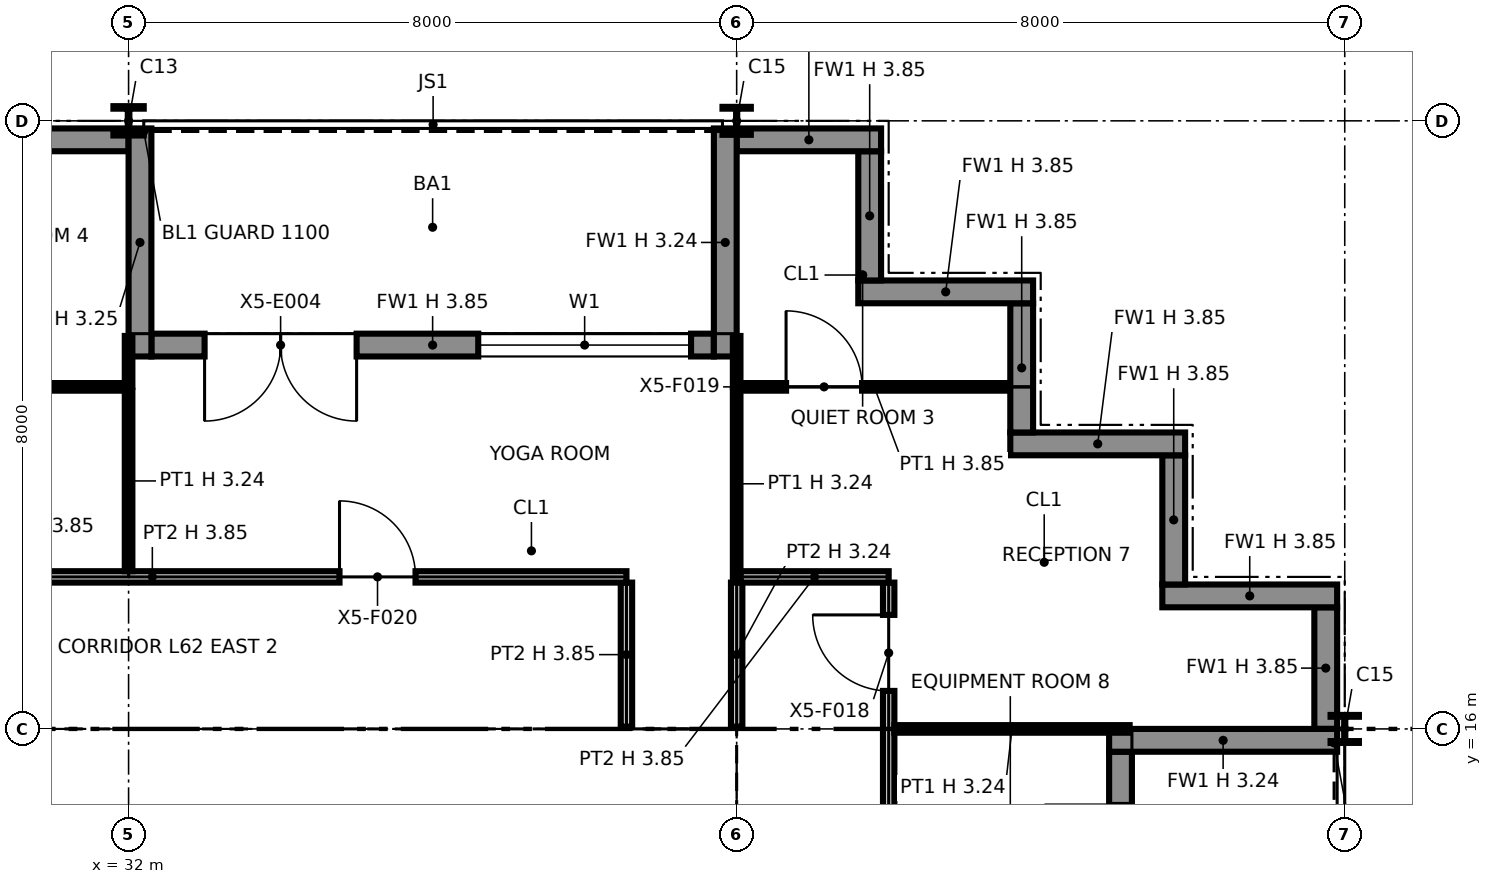
"""IFC4 building model, lengths in metres.
Left out: names, types, materials, properties, quantities, classifications, styles, units other than length and angle.
Written with IfcOpenShell. Run it as: python <this file> out.ifc"""

import sys

from ifc_helpers import new_model, si_unit, direction, frame, frame_2d, origin, origin_2d, place, context, subcontext, project, spatial, polyline, rectangle, i_section, outline, extrude, element, fill, save


model = new_model("IFC4")
c1 = context("Model", 3, precision=1e-05, world=origin(), true_north=direction((0.0, 1.0)))
c2 = subcontext(c1, "Body", "Model", "MODEL_VIEW")
j1 = project(units=[si_unit("LENGTHUNIT", "METRE"), si_unit("PLANEANGLEUNIT", "RADIAN")], contexts=[c1])
p1 = place(None, origin())
s1 = spatial("IfcSite", under=j1, at=p1, CompositionType="ELEMENT")
p2 = place(p1, origin())
s2 = spatial("IfcBuilding", under=s1, at=p2, CompositionType="ELEMENT")
p3 = place(p2, frame((0.0, 0.0, 283.0)))
s3 = spatial("IfcBuildingStorey", under=s2, at=p3, CompositionType="ELEMENT", Elevation=283.0)
p4 = place(p3, frame((32.0, 16.0, 0.0), z_axis=(0.0, 0.0, 1.0), x_axis=(1.0, 0.0, 0.0)))
e1 = element("IfcColumn", 1, at=p4, inside=s3, PredefinedType="COLUMN", context=c2, shape_type="SweptSolid", body=[
    extrude(i_section(OverallWidth=0.257, OverallDepth=0.363, WebThickness=0.013, FlangeThickness=0.022, at=origin_2d()), origin(), (0.0, 0.0, 1.0), 3.85),
])
p5 = place(p3, frame((32.0, 24.0, 0.0), z_axis=(0.0, 0.0, 1.0), x_axis=(1.0, 0.0, 0.0)))
e2 = element("IfcColumn", 2, at=p5, inside=s3, PredefinedType="COLUMN", context=c2, shape_type="SweptSolid", body=[
    extrude(i_section(OverallWidth=0.399, OverallDepth=0.386, WebThickness=0.021, FlangeThickness=0.033, at=origin_2d()), origin(), (0.0, 0.0, 1.0), 3.85),
])
p6 = place(p3, frame((40.0, 16.0, 0.0), z_axis=(0.0, 0.0, 1.0), x_axis=(1.0, 0.0, 0.0)))
e3 = element("IfcColumn", 3, at=p6, inside=s3, PredefinedType="COLUMN", context=c2, shape_type="SweptSolid", body=[
    extrude(i_section(OverallWidth=0.257, OverallDepth=0.363, WebThickness=0.013, FlangeThickness=0.022, at=origin_2d()), origin(), (0.0, 0.0, 1.0), 3.85),
])
for number, where, z_axis, x_axis in (
    (4, (40.0, 24.0, 0.0), (0.0, 0.0, 1.0), (1.0, 0.0, 0.0)),
    (5, (48.0, 16.0, 0.0), (0.0, 0.0, 1.0), (1.0, 0.0, 0.0)),
):
    element("IfcColumn", number, at=place(p3, frame(where, z_axis=z_axis, x_axis=x_axis)), inside=s3, PredefinedType="COLUMN", context=c2, shape_type="SweptSolid", body=[
        extrude(i_section(OverallWidth=0.373, OverallDepth=0.368, WebThickness=0.015, FlangeThickness=0.024, at=origin_2d()), origin(), (0.0, 0.0, 1.0), 3.85),
    ])
p7 = place(p3, frame((45.05, 8.3, 0.0), z_axis=(0.0, 0.0, 1.0), x_axis=(0.0, 1.0, 0.0)))
e6 = element("IfcWall", 6, at=p7, inside=s3, PredefinedType="SOLIDWALL", context=c2, shape_type="SweptSolid", body=[
    extrude(rectangle(XDim=7.4, YDim=0.3, at=frame_2d((3.7, 0.0))), origin(), (0.0, 0.0, 1.0), 3.85),
])
p8 = place(p7, frame((0.3, 0.0, 0.9)))
e7 = element("IfcOpeningElement", 7, at=p8, cuts=e6, PredefinedType="OPENING", context=c2, shape_type="SweptSolid", body=[
    extrude(rectangle(XDim=2.8, YDim=2.2, at=frame_2d((1.4, 1.1))), frame((0.0, 0.16, 0.0), z_axis=(0.0, -1.0, 0.0), x_axis=(1.0, 0.0, 0.0)), (0.0, 0.0, 1.0), 0.32),
])
p9 = place(p7, frame((4.7, 0.0, 0.0)))
e8 = element("IfcOpeningElement", 8, at=p9, cuts=e6, PredefinedType="OPENING", context=c2, shape_type="SweptSolid", body=[
    extrude(rectangle(XDim=2.0, YDim=2.4, at=frame_2d((1.0, 1.2))), frame((0.0, 0.16, 0.0), z_axis=(0.0, -1.0, 0.0), x_axis=(1.0, 0.0, 0.0)), (0.0, 0.0, 1.0), 0.32),
])
p10 = place(p3, frame((47.9, 15.85, 0.0), z_axis=(0.0, 0.0, 1.0), x_axis=(-1.0, 0.0, 0.0)))
e9 = element("IfcWall", 9, at=p10, inside=s3, PredefinedType="SOLIDWALL", context=c2, shape_type="SweptSolid", body=[
    extrude(rectangle(XDim=3.0, YDim=0.3, at=frame_2d((1.5, 0.0))), origin(), (0.0, 0.0, 1.0), 3.237),
])
p11 = place(p3, frame((47.75, 16.0, 0.0), z_axis=(0.0, 0.0, 1.0), x_axis=(0.0, 1.0, 0.0)))
e10 = element("IfcWall", 10, at=p11, inside=s3, PredefinedType="SOLIDWALL", context=c2, shape_type="SweptSolid", body=[
    extrude(rectangle(XDim=1.6, YDim=0.3, at=frame_2d((0.8, 0.0))), origin(), (0.0, 0.0, 1.0), 3.85),
])
p12 = place(p3, frame((47.9, 17.75, 0.0), z_axis=(0.0, 0.0, 1.0), x_axis=(-1.0, 0.0, 0.0)))
e11 = element("IfcWall", 11, at=p12, inside=s3, PredefinedType="SOLIDWALL", context=c2, shape_type="SweptSolid", body=[
    extrude(rectangle(XDim=2.3, YDim=0.3, at=frame_2d((1.15, 0.0))), origin(), (0.0, 0.0, 1.0), 3.85),
])
p13 = place(p3, frame((45.75, 17.9, 0.0), z_axis=(0.0, 0.0, 1.0), x_axis=(0.0, 1.0, 0.0)))
e12 = element("IfcWall", 12, at=p13, inside=s3, PredefinedType="SOLIDWALL", context=c2, shape_type="SweptSolid", body=[
    extrude(rectangle(XDim=1.7, YDim=0.3, at=frame_2d((0.85, 0.0))), origin(), (0.0, 0.0, 1.0), 3.85),
])
p14 = place(p3, frame((45.9, 19.75, 0.0), z_axis=(0.0, 0.0, 1.0), x_axis=(-1.0, 0.0, 0.0)))
e13 = element("IfcWall", 13, at=p14, inside=s3, PredefinedType="SOLIDWALL", context=c2, shape_type="SweptSolid", body=[
    extrude(rectangle(XDim=2.3, YDim=0.3, at=frame_2d((1.15, 0.0))), origin(), (0.0, 0.0, 1.0), 3.85),
])
p15 = place(p3, frame((43.75, 19.9, 0.0), z_axis=(0.0, 0.0, 1.0), x_axis=(0.0, 1.0, 0.0)))
e14 = element("IfcWall", 14, at=p15, inside=s3, PredefinedType="SOLIDWALL", context=c2, shape_type="SweptSolid", body=[
    extrude(rectangle(XDim=1.7, YDim=0.3, at=frame_2d((0.85, 0.0))), origin(), (0.0, 0.0, 1.0), 3.85),
])
p16 = place(p3, frame((43.9, 21.75, 0.0), z_axis=(0.0, 0.0, 1.0), x_axis=(-1.0, 0.0, 0.0)))
e15 = element("IfcWall", 15, at=p16, inside=s3, PredefinedType="SOLIDWALL", context=c2, shape_type="SweptSolid", body=[
    extrude(rectangle(XDim=2.3, YDim=0.3, at=frame_2d((1.15, 0.0))), origin(), (0.0, 0.0, 1.0), 3.85),
])
p17 = place(p3, frame((41.75, 21.9, 0.0), z_axis=(0.0, 0.0, 1.0), x_axis=(0.0, 1.0, 0.0)))
e16 = element("IfcWall", 16, at=p17, inside=s3, PredefinedType="SOLIDWALL", context=c2, shape_type="SweptSolid", body=[
    extrude(rectangle(XDim=1.7, YDim=0.3, at=frame_2d((0.85, 0.0))), origin(), (0.0, 0.0, 1.0), 3.85),
])
p18 = place(p3, frame((41.9, 23.75, 0.0), z_axis=(0.0, 0.0, 1.0), x_axis=(-1.0, 0.0, 0.0)))
e17 = element("IfcWall", 17, at=p18, inside=s3, PredefinedType="SOLIDWALL", context=c2, shape_type="SweptSolid", body=[
    extrude(rectangle(XDim=1.9, YDim=0.3, at=frame_2d((0.95, 0.0))), origin(), (0.0, 0.0, 1.0), 3.85),
])
p19 = place(p3, frame((39.7, 21.05, 0.0), z_axis=(0.0, 0.0, 1.0), x_axis=(-1.0, 0.0, 0.0)))
e18 = element("IfcWall", 18, at=p19, inside=s3, PredefinedType="SOLIDWALL", context=c2, shape_type="SweptSolid", body=[
    extrude(rectangle(XDim=7.4, YDim=0.3, at=frame_2d((3.7, 0.0))), origin(), (0.0, 0.0, 1.0), 3.85),
])
p20 = place(p19, frame((0.3, 0.0, 0.9)))
e19 = element("IfcOpeningElement", 19, at=p20, cuts=e18, PredefinedType="OPENING", context=c2, shape_type="SweptSolid", body=[
    extrude(rectangle(XDim=2.8, YDim=2.2, at=frame_2d((1.4, 1.1))), frame((0.0, 0.16, 0.0), z_axis=(0.0, -1.0, 0.0), x_axis=(1.0, 0.0, 0.0)), (0.0, 0.0, 1.0), 0.32),
])
p21 = place(p19, frame((4.7, 0.0, 0.0)))
e20 = element("IfcOpeningElement", 20, at=p21, cuts=e18, PredefinedType="OPENING", context=c2, shape_type="SweptSolid", body=[
    extrude(rectangle(XDim=2.0, YDim=2.4, at=frame_2d((1.0, 1.2))), frame((0.0, 0.16, 0.0), z_axis=(0.0, -1.0, 0.0), x_axis=(1.0, 0.0, 0.0)), (0.0, 0.0, 1.0), 0.32),
])
p22 = place(p3, frame((39.85, 23.9, 0.0), z_axis=(0.0, 0.0, 1.0), x_axis=(0.0, -1.0, 0.0)))
e21 = element("IfcWall", 21, at=p22, inside=s3, PredefinedType="SOLIDWALL", context=c2, shape_type="SweptSolid", body=[
    extrude(rectangle(XDim=3.0, YDim=0.3, at=frame_2d((1.5, 0.0))), origin(), (0.0, 0.0, 1.0), 3.237),
])
p23 = place(p3, frame((32.15, 23.9, 0.0), z_axis=(0.0, 0.0, 1.0), x_axis=(0.0, -1.0, 0.0)))
e22 = element("IfcWall", 22, at=p23, inside=s3, PredefinedType="SOLIDWALL", context=c2, shape_type="SweptSolid", body=[
    extrude(rectangle(XDim=3.0, YDim=0.3, at=frame_2d((1.5, 0.0))), origin(), (0.0, 0.0, 1.0), 3.247),
])
p24 = place(p3, frame((32.0, 23.75, 0.0), z_axis=(0.0, 0.0, 1.0), x_axis=(-1.0, 0.0, 0.0)))
e23 = element("IfcWall", 23, at=p24, inside=s3, PredefinedType="SOLIDWALL", context=c2, shape_type="SweptSolid", body=[
    extrude(rectangle(XDim=25.9, YDim=0.3, at=frame_2d((12.95, 0.0))), origin(), (0.0, 0.0, 1.0), 3.85),
])
p25 = place(p3, frame((24.65, 15.25, 0.0), z_axis=(0.0, 0.0, 1.0), x_axis=(1.0, 0.0, 0.0)))
e24 = element("IfcWall", 24, at=p25, inside=s3, PredefinedType="PARTITIONING", context=c2, shape_type="SweptSolid", body=[
    extrude(outline(polyline([(0.0, 0.0), (14.7, 0.0), (14.7, 3.85), (7.438, 3.85), (7.437, 3.318), (7.263, 3.318), (7.262, 3.85), (0.0, 3.85), (0.0, 0.0)])), frame((0.0, 0.1, 0.0), z_axis=(0.0, -1.0, 0.0), x_axis=(1.0, 0.0, 0.0)), (0.0, 0.0, 1.0), 0.2),
])
p26 = place(p25, frame((2.85, 0.0, 0.0)))
e25 = element("IfcOpeningElement", 25, at=p26, cuts=e24, PredefinedType="OPENING", context=c2, shape_type="SweptSolid", body=[
    extrude(rectangle(XDim=1.8, YDim=2.1, at=frame_2d((0.9, 1.05))), frame((0.0, 0.11, 0.0), z_axis=(0.0, -1.0, 0.0), x_axis=(1.0, 0.0, 0.0)), (0.0, 0.0, 1.0), 0.22),
])
p27 = place(p25, frame((9.95, 0.0, 0.0), z_axis=(0.0, 0.0, 1.0), x_axis=(-1.0, 0.0, 0.0)))
e26 = element("IfcOpeningElement", 26, at=p27, cuts=e24, PredefinedType="OPENING", context=c2, shape_type="SweptSolid", body=[
    extrude(rectangle(XDim=1.4, YDim=2.1, at=frame_2d((0.7, 1.05))), frame((0.0, 0.11, 0.0), z_axis=(0.0, -1.0, 0.0), x_axis=(1.0, 0.0, 0.0)), (0.0, 0.0, 1.0), 0.22),
])
p28 = place(p25, frame((13.4, 0.0, 0.0), z_axis=(0.0, 0.0, 1.0), x_axis=(-1.0, 0.0, 0.0)))
e27 = element("IfcOpeningElement", 27, at=p28, cuts=e24, PredefinedType="OPENING", context=c2, shape_type="SweptSolid", body=[
    extrude(rectangle(XDim=1.4, YDim=2.1, at=frame_2d((0.7, 1.05))), frame((0.0, 0.11, 0.0), z_axis=(0.0, -1.0, 0.0), x_axis=(1.0, 0.0, 0.0)), (0.0, 0.0, 1.0), 0.22),
])
p29 = place(p3, frame((32.0, 11.6, 0.0), z_axis=(0.0, 0.0, 1.0), x_axis=(0.0, 1.0, 0.0)))
e28 = element("IfcWall", 28, at=p29, inside=s3, PredefinedType="PARTITIONING", context=c2, shape_type="SweptSolid", body=[
    extrude(rectangle(XDim=3.55, YDim=0.6, at=frame_2d((1.775, 0.0))), origin(), (0.0, 0.0, 1.0), 3.318),
])
for number, where, z_axis, x_axis in (
    (29, (35.6, 8.85, 0.0), (0.0, 0.0, 1.0), (0.0, 1.0, 0.0)),
    (30, (39.25, 8.85, 0.0), (0.0, 0.0, 1.0), (0.0, 1.0, 0.0)),
):
    element("IfcWall", number, at=place(p3, frame(where, z_axis=z_axis, x_axis=x_axis)), inside=s3, PredefinedType="PARTITIONING", context=c2, shape_type="SweptSolid", body=[
        extrude(rectangle(XDim=6.3, YDim=0.2, at=frame_2d((3.15, 0.0))), origin(), (0.0, 0.0, 1.0), 3.85),
    ])
p30 = place(p3, frame((42.0, 6.0, 0.0), z_axis=(0.0, 0.0, 1.0), x_axis=(0.0, 1.0, 0.0)))
e31 = element("IfcWall", 31, at=p30, inside=s3, PredefinedType="PARTITIONING", context=c2, shape_type="SweptSolid", body=[
    extrude(outline(polyline([(0.0, 0.0), (11.925, 0.0), (11.925, 3.85), (10.3, 3.85), (10.298, 3.238), (9.702, 3.238), (9.7, 3.85), (6.3, 3.85), (6.298, 3.238), (5.702, 3.238), (5.7, 3.85), (2.3, 3.85), (2.298, 3.238), (1.702, 3.238), (1.7, 3.85), (0.0, 3.85), (0.0, 0.0)])), frame((0.0, 0.075, 0.0), z_axis=(0.0, -1.0, 0.0), x_axis=(1.0, 0.0, 0.0)), (0.0, 0.0, 1.0), 0.15),
])
p31 = place(p30, frame((4.5, 0.0, 0.0), z_axis=(0.0, 0.0, 1.0), x_axis=(-1.0, 0.0, 0.0)))
e32 = element("IfcOpeningElement", 32, at=p31, cuts=e31, PredefinedType="OPENING", context=c2, shape_type="SweptSolid", body=[
    extrude(rectangle(XDim=1.0, YDim=2.1, at=frame_2d((0.5, 1.05))), frame((0.0, 0.085, 0.0), z_axis=(0.0, -1.0, 0.0), x_axis=(1.0, 0.0, 0.0)), (0.0, 0.0, 1.0), 0.17),
])
p32 = place(p30, frame((8.5, 0.0, 0.0), z_axis=(0.0, 0.0, 1.0), x_axis=(-1.0, 0.0, 0.0)))
e33 = element("IfcOpeningElement", 33, at=p32, cuts=e31, PredefinedType="OPENING", context=c2, shape_type="SweptSolid", body=[
    extrude(rectangle(XDim=1.0, YDim=2.1, at=frame_2d((0.5, 1.05))), frame((0.0, 0.085, 0.0), z_axis=(0.0, -1.0, 0.0), x_axis=(1.0, 0.0, 0.0)), (0.0, 0.0, 1.0), 0.17),
])
p33 = place(p30, frame((10.5, 0.0, 0.0)))
e34 = element("IfcOpeningElement", 34, at=p33, cuts=e31, PredefinedType="OPENING", context=c2, shape_type="SweptSolid", body=[
    extrude(rectangle(XDim=1.0, YDim=2.1, at=frame_2d((0.5, 1.05))), frame((0.0, 0.085, 0.0), z_axis=(0.0, -1.0, 0.0), x_axis=(1.0, 0.0, 0.0)), (0.0, 0.0, 1.0), 0.17),
])
p34 = place(p3, frame((42.075, 16.0, 0.0), z_axis=(0.0, 0.0, 1.0), x_axis=(1.0, 0.0, 0.0)))
e35 = element("IfcWall", 35, at=p34, inside=s3, PredefinedType="PARTITIONING", context=c2, shape_type="SweptSolid", body=[
    extrude(rectangle(XDim=3.095, YDim=0.1, at=frame_2d((1.547, 0.0))), origin(), (0.0, 0.0, 1.0), 3.238),
])
p35 = place(p3, frame((38.55, 16.03, 0.0), z_axis=(0.0, 0.0, 1.0), x_axis=(0.0, 1.0, 0.0)))
e36 = element("IfcWall", 36, at=p35, inside=s3, PredefinedType="PARTITIONING", context=c2, shape_type="SweptSolid", body=[
    extrude(rectangle(XDim=1.895, YDim=0.15, at=frame_2d((0.948, 0.0))), origin(), (0.0, 0.0, 1.0), 3.85),
])
p36 = place(p3, frame((40.0, 16.03, 0.0), z_axis=(0.0, 0.0, 1.0), x_axis=(0.0, 1.0, 0.0)))
e37 = element("IfcWall", 37, at=p36, inside=s3, PredefinedType="PARTITIONING", context=c2, shape_type="SweptSolid", body=[
    extrude(rectangle(XDim=1.895, YDim=0.15, at=frame_2d((0.948, 0.0))), origin(), (0.0, 0.0, 1.0), 3.238),
])
p37 = place(p3, frame((26.075, 18.0, 0.0), z_axis=(0.0, 0.0, 1.0), x_axis=(1.0, 0.0, 0.0)))
e38 = element("IfcWall", 38, at=p37, inside=s3, PredefinedType="PARTITIONING", context=c2, shape_type="SweptSolid", body=[
    extrude(rectangle(XDim=12.475, YDim=0.15, at=frame_2d((6.238, 0.0))), origin(), (0.0, 0.0, 1.0), 3.85),
])
p38 = place(p37, frame((8.7, 0.0, 0.0)))
e39 = element("IfcOpeningElement", 39, at=p38, cuts=e38, PredefinedType="OPENING", context=c2, shape_type="SweptSolid", body=[
    extrude(rectangle(XDim=1.0, YDim=2.1, at=frame_2d((0.5, 1.05))), frame((0.0, 0.085, 0.0), z_axis=(0.0, -1.0, 0.0), x_axis=(1.0, 0.0, 0.0)), (0.0, 0.0, 1.0), 0.17),
])
p39 = place(p37, frame((2.925, 0.0, 0.0)))
e40 = element("IfcOpeningElement", 40, at=p39, cuts=e38, PredefinedType="OPENING", context=c2, shape_type="SweptSolid", body=[
    extrude(rectangle(XDim=1.0, YDim=2.1, at=frame_2d((0.5, 1.05))), frame((0.0, 0.085, 0.0), z_axis=(0.0, -1.0, 0.0), x_axis=(1.0, 0.0, 0.0)), (0.0, 0.0, 1.0), 0.17),
])
p40 = place(p3, frame((32.0, 18.075, 0.0), z_axis=(0.0, 0.0, 1.0), x_axis=(0.0, 1.0, 0.0)))
e41 = element("IfcWall", 41, at=p40, inside=s3, PredefinedType="PARTITIONING", context=c2, shape_type="SweptSolid", body=[
    extrude(rectangle(XDim=2.375, YDim=0.1, at=frame_2d((1.188, 0.0))), origin(), (0.0, 0.0, 1.0), 3.238),
])
p41 = place(p3, frame((40.05, 18.0, 0.0), z_axis=(0.0, 0.0, 1.0), x_axis=(1.0, 0.0, 0.0)))
e42 = element("IfcWall", 42, at=p41, inside=s3, PredefinedType="PARTITIONING", context=c2, shape_type="SweptSolid", body=[
    extrude(rectangle(XDim=1.95, YDim=0.15, at=frame_2d((0.975, 0.0))), origin(), (0.0, 0.0, 1.0), 3.85),
])
p42 = place(p3, frame((40.0, 18.0, 0.0), z_axis=(0.0, 0.0, 1.0), x_axis=(0.0, 1.0, 0.0)))
e43 = element("IfcWall", 43, at=p42, inside=s3, PredefinedType="PARTITIONING", context=c2, shape_type="SweptSolid", body=[
    extrude(rectangle(XDim=2.45, YDim=0.1, at=frame_2d((1.225, 0.0))), origin(), (0.0, 0.0, 1.0), 3.238),
])
p43 = place(p3, frame((26.075, 20.5, 0.0), z_axis=(0.0, 0.0, 1.0), x_axis=(1.0, 0.0, 0.0)))
e44 = element("IfcWall", 44, at=p43, inside=s3, PredefinedType="PARTITIONING", context=c2, shape_type="SweptSolid", body=[
    extrude(rectangle(XDim=5.875, YDim=0.1, at=frame_2d((2.938, 0.0))), origin(), (0.0, 0.0, 1.0), 3.85),
])
p44 = place(p43, frame((2.425, 0.0, 0.0)))
e45 = element("IfcOpeningElement", 45, at=p44, cuts=e44, PredefinedType="OPENING", context=c2, shape_type="SweptSolid", body=[
    extrude(rectangle(XDim=1.0, YDim=2.1, at=frame_2d((0.5, 1.05))), frame((0.0, 0.06, 0.0), z_axis=(0.0, -1.0, 0.0), x_axis=(1.0, 0.0, 0.0)), (0.0, 0.0, 1.0), 0.12),
])
p45 = place(p3, frame((32.0, 20.5, 0.0), z_axis=(0.0, 0.0, 1.0), x_axis=(0.0, 1.0, 0.0)))
e46 = element("IfcWall", 46, at=p45, inside=s3, PredefinedType="PARTITIONING", context=c2, shape_type="SweptSolid", body=[
    extrude(rectangle(XDim=0.67, YDim=0.1, at=frame_2d((0.335, 0.0))), origin(), (0.0, 0.0, 1.0), 3.238),
])
p46 = place(p3, frame((40.05, 20.5, 0.0), z_axis=(0.0, 0.0, 1.0), x_axis=(1.0, 0.0, 0.0)))
e47 = element("IfcWall", 47, at=p46, inside=s3, PredefinedType="PARTITIONING", context=c2, shape_type="SweptSolid", body=[
    extrude(rectangle(XDim=3.52, YDim=0.1, at=frame_2d((1.76, 0.0))), origin(), (0.0, 0.0, 1.0), 3.85),
])
p47 = place(p46, frame((0.6, 0.0, 0.0)))
e48 = element("IfcOpeningElement", 48, at=p47, cuts=e47, PredefinedType="OPENING", context=c2, shape_type="SweptSolid", body=[
    extrude(rectangle(XDim=1.0, YDim=2.1, at=frame_2d((0.5, 1.05))), frame((0.0, 0.06, 0.0), z_axis=(0.0, -1.0, 0.0), x_axis=(1.0, 0.0, 0.0)), (0.0, 0.0, 1.0), 0.12),
])
p48 = place(p3, frame((40.0, 20.5, 0.0), z_axis=(0.0, 0.0, 1.0), x_axis=(0.0, 1.0, 0.0)))
e49 = element("IfcWall", 49, at=p48, inside=s3, PredefinedType="PARTITIONING", context=c2, shape_type="SweptSolid", body=[
    extrude(rectangle(XDim=0.67, YDim=0.1, at=frame_2d((0.335, 0.0))), origin(), (0.0, 0.0, 1.0), 3.238),
])
p49 = place(p20, origin())
e50 = element("IfcWindow", 50, at=p49, inside=s3, PartitioningType="SINGLE_PANEL", PredefinedType="WINDOW", context=c2, shape_type="SweptSolid", body=[
    extrude(rectangle(XDim=2.8, YDim=2.2, at=frame_2d((1.4, 1.1))), frame((0.0, 0.03, 0.0), z_axis=(0.0, -1.0, 0.0), x_axis=(1.0, 0.0, 0.0)), (0.0, 0.0, 1.0), 0.06),
])
fill(e19, e50)
p50 = place(p21, origin())
e51 = element("IfcDoor", 51, at=p50, inside=s3, OperationType="DOUBLE_DOOR_SINGLE_SWING", PredefinedType="DOOR", context=c2, shape_type="SweptSolid", body=[
    extrude(rectangle(XDim=2.0, YDim=2.4, at=frame_2d((1.0, 1.2))), frame((0.0, 0.025, 0.0), z_axis=(0.0, -1.0, 0.0), x_axis=(1.0, 0.0, 0.0)), (0.0, 0.0, 1.0), 0.05),
])
fill(e20, e51)
p51 = place(p27, origin())
e52 = element("IfcDoor", 52, at=p51, inside=s3, OperationType="DOUBLE_DOOR_SINGLE_SWING", PredefinedType="NOTDEFINED", context=c2, shape_type="SweptSolid", body=[
    extrude(rectangle(XDim=1.4, YDim=2.1, at=frame_2d((0.7, 1.05))), frame((0.0, 0.025, 0.0), z_axis=(0.0, -1.0, 0.0), x_axis=(1.0, 0.0, 0.0)), (0.0, 0.0, 1.0), 0.05),
])
fill(e26, e52)
p52 = place(p28, origin())
e53 = element("IfcDoor", 53, at=p52, inside=s3, OperationType="DOUBLE_DOOR_SINGLE_SWING", PredefinedType="NOTDEFINED", context=c2, shape_type="SweptSolid", body=[
    extrude(rectangle(XDim=1.4, YDim=2.1, at=frame_2d((0.7, 1.05))), frame((0.0, 0.025, 0.0), z_axis=(0.0, -1.0, 0.0), x_axis=(1.0, 0.0, 0.0)), (0.0, 0.0, 1.0), 0.05),
])
fill(e27, e53)
p53 = place(p33, origin())
e54 = element("IfcDoor", 54, at=p53, inside=s3, OperationType="SINGLE_SWING_RIGHT", PredefinedType="DOOR", context=c2, shape_type="SweptSolid", body=[
    extrude(rectangle(XDim=1.0, YDim=2.1, at=frame_2d((0.5, 1.05))), frame((0.0, 0.025, 0.0), z_axis=(0.0, -1.0, 0.0), x_axis=(1.0, 0.0, 0.0)), (0.0, 0.0, 1.0), 0.05),
])
fill(e34, e54)
p54 = place(p47, origin())
e55 = element("IfcDoor", 55, at=p54, inside=s3, OperationType="SINGLE_SWING_LEFT", PredefinedType="DOOR", context=c2, shape_type="SweptSolid", body=[
    extrude(rectangle(XDim=1.0, YDim=2.1, at=frame_2d((0.5, 1.05))), frame((0.0, 0.025, 0.0), z_axis=(0.0, -1.0, 0.0), x_axis=(1.0, 0.0, 0.0)), (0.0, 0.0, 1.0), 0.05),
])
fill(e48, e55)
p55 = place(p38, origin())
e56 = element("IfcDoor", 56, at=p55, inside=s3, OperationType="SINGLE_SWING_LEFT", PredefinedType="DOOR", context=c2, shape_type="SweptSolid", body=[
    extrude(rectangle(XDim=1.0, YDim=2.1, at=frame_2d((0.5, 1.05))), frame((0.0, 0.025, 0.0), z_axis=(0.0, -1.0, 0.0), x_axis=(1.0, 0.0, 0.0)), (0.0, 0.0, 1.0), 0.05),
])
fill(e39, e56)
save(model, sys.argv[1])
